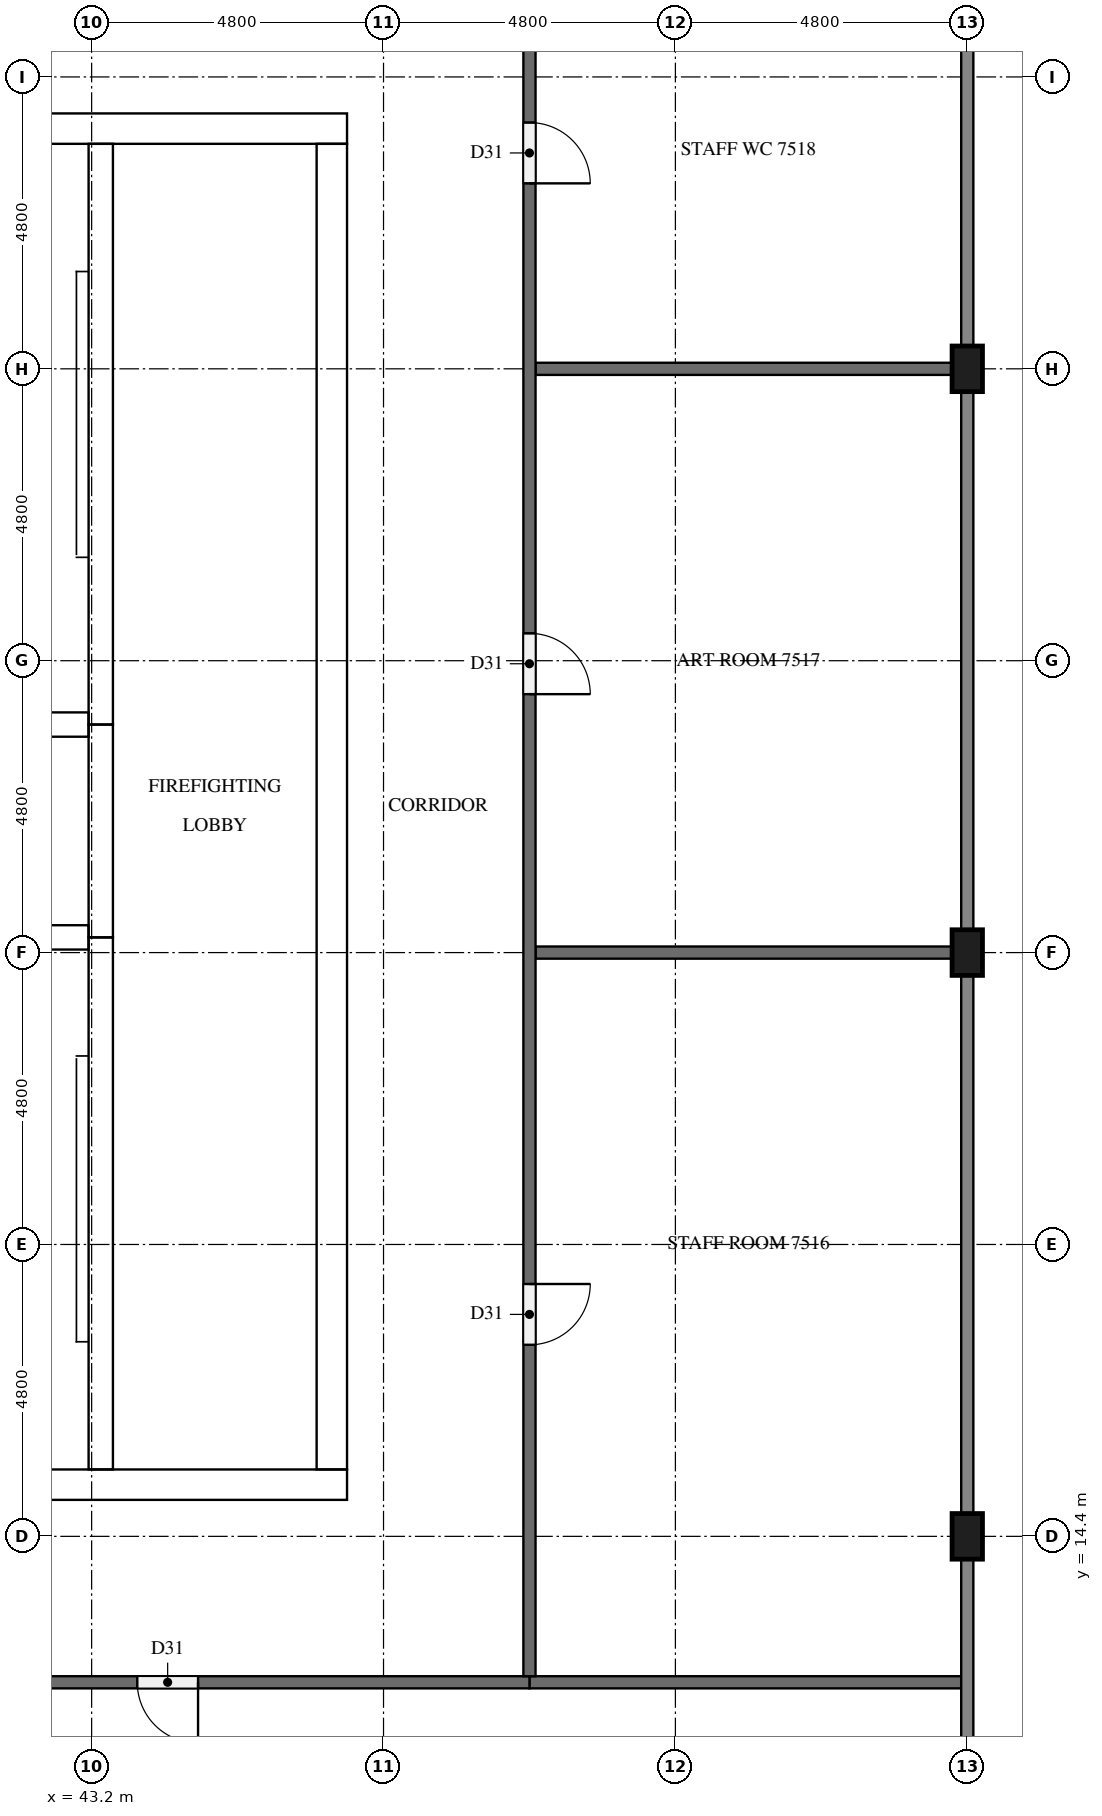
"""IFC4 building model, lengths in metres.
Left out: names, types, materials, properties, quantities, classifications, styles, units other than length and angle.
Written with IfcOpenShell. Run it as: python <this file> out.ifc"""

import sys

from ifc_helpers import new_model, si_unit, direction, frame, frame_2d, origin, origin_2d, place, context, subcontext, project, spatial, rectangle, extrude, element, fill, save


model = new_model("IFC4")
c1 = context("Model", 3, precision=1e-05, world=origin(), true_north=direction((0.0, 1.0)))
c2 = subcontext(c1, "Body", "Model", "MODEL_VIEW")
j1 = project(units=[si_unit("LENGTHUNIT", "METRE"), si_unit("PLANEANGLEUNIT", "RADIAN")], contexts=[c1])
p1 = place(None, origin())
s1 = spatial("IfcSite", under=j1, at=p1, CompositionType="ELEMENT")
p2 = place(p1, origin())
s2 = spatial("IfcBuilding", under=s1, at=p2, CompositionType="ELEMENT")
p3 = place(p2, frame((0.0, 0.0, 286.1)))
s3 = spatial("IfcBuildingStorey", under=s2, at=p3, CompositionType="ELEMENT", Elevation=286.1)
p4 = place(p3, frame((15.0, 15.25, 0.0), z_axis=(0.0, 0.0, 1.0), x_axis=(1.0, 0.0, 0.0)))
e1 = element("IfcWall", 1, at=p4, inside=s3, PredefinedType="SHEAR", context=c2, shape_type="SweptSolid", body=[
    extrude(rectangle(XDim=32.4, YDim=0.5, at=frame_2d((16.2, 0.0))), origin(), (0.0, 0.0, 1.0), 5.1),
])
p5 = place(p4, frame((15.3, 0.0, 0.0)))
e2 = element("IfcOpeningElement", 2, at=p5, cuts=e1, PredefinedType="OPENING", context=c2, shape_type="SweptSolid", body=[
    extrude(rectangle(XDim=1.8, YDim=2.1, at=frame_2d((0.9, 1.05))), frame((0.0, 0.26, 0.0), z_axis=(0.0, -1.0, 0.0), x_axis=(1.0, 0.0, 0.0)), (0.0, 0.0, 1.0), 0.52),
])
p6 = place(p3, frame((15.0, 37.55, 0.0), z_axis=(0.0, 0.0, 1.0), x_axis=(1.0, 0.0, 0.0)))
e3 = element("IfcWall", 3, at=p6, inside=s3, PredefinedType="SHEAR", context=c2, shape_type="SweptSolid", body=[
    extrude(rectangle(XDim=32.4, YDim=0.5, at=frame_2d((16.2, 0.0))), origin(), (0.0, 0.0, 1.0), 5.1),
])
p7 = place(p6, frame((15.3, 0.0, 0.0)))
e4 = element("IfcOpeningElement", 4, at=p7, cuts=e3, PredefinedType="OPENING", context=c2, shape_type="SweptSolid", body=[
    extrude(rectangle(XDim=1.8, YDim=2.1, at=frame_2d((0.9, 1.05))), frame((0.0, 0.26, 0.0), z_axis=(0.0, -1.0, 0.0), x_axis=(1.0, 0.0, 0.0)), (0.0, 0.0, 1.0), 0.52),
])
p8 = place(p6, frame((1.282, 0.0, 0.0)))
e5 = element("IfcOpeningElement", 5, at=p8, cuts=e3, PredefinedType="OPENING", context=c2, shape_type="SweptSolid", body=[
    extrude(rectangle(XDim=1.0, YDim=2.1, at=frame_2d((0.5, 1.05))), frame((0.0, 0.26, 0.0), z_axis=(0.0, -1.0, 0.0), x_axis=(1.0, 0.0, 0.0)), (0.0, 0.0, 1.0), 0.52),
])
p9 = place(p6, frame((5.082, 0.0, 0.0)))
e6 = element("IfcOpeningElement", 6, at=p9, cuts=e3, PredefinedType="OPENING", context=c2, shape_type="SweptSolid", body=[
    extrude(rectangle(XDim=1.0, YDim=2.1, at=frame_2d((0.5, 1.05))), frame((0.0, 0.26, 0.0), z_axis=(0.0, -1.0, 0.0), x_axis=(1.0, 0.0, 0.0)), (0.0, 0.0, 1.0), 0.52),
])
p10 = place(p3, frame((47.15, 15.5, 0.0), z_axis=(0.0, 0.0, 1.0), x_axis=(0.0, 1.0, 0.0)))
e7 = element("IfcWall", 7, at=p10, inside=s3, PredefinedType="SHEAR", context=c2, shape_type="SweptSolid", body=[
    extrude(rectangle(XDim=21.8, YDim=0.5, at=frame_2d((10.9, 0.0))), origin(), (0.0, 0.0, 1.0), 5.1),
])
p11 = place(p10, frame((10.6, 0.0, 0.0)))
e8 = element("IfcOpeningElement", 8, at=p11, cuts=e7, PredefinedType="OPENING", context=c2, shape_type="SweptSolid", body=[
    extrude(rectangle(XDim=1.2, YDim=2.1, at=frame_2d((0.6, 1.05))), frame((0.0, 0.26, 0.0), z_axis=(0.0, -1.0, 0.0), x_axis=(1.0, 0.0, 0.0)), (0.0, 0.0, 1.0), 0.52),
])
p12 = place(p3, frame((43.35, 15.5, 0.0), z_axis=(0.0, 0.0, 1.0), x_axis=(0.0, 1.0, 0.0)))
e9 = element("IfcWall", 9, at=p12, inside=s3, PredefinedType="SHEAR", context=c2, shape_type="SweptSolid", body=[
    extrude(rectangle(XDim=8.75, YDim=0.4, at=frame_2d((4.375, 0.0))), origin(), (0.0, 0.0, 1.0), 5.1),
])
p13 = place(p12, frame((0.7, 0.0, 0.0)))
e10 = element("IfcOpeningElement", 10, at=p13, cuts=e9, PredefinedType="OPENING", context=c2, shape_type="SweptSolid", body=[
    extrude(rectangle(XDim=1.2, YDim=2.1, at=frame_2d((0.6, 1.05))), frame((0.0, 0.21, 0.0), z_axis=(0.0, -1.0, 0.0), x_axis=(1.0, 0.0, 0.0)), (0.0, 0.0, 1.0), 0.42),
])
p14 = place(p3, frame((43.35, 24.25, 0.0), z_axis=(0.0, 0.0, 1.0), x_axis=(0.0, 1.0, 0.0)))
e11 = element("IfcWall", 11, at=p14, inside=s3, PredefinedType="SHEAR", context=c2, shape_type="SweptSolid", body=[
    extrude(rectangle(XDim=3.5, YDim=0.4, at=frame_2d((1.75, 0.0))), origin(), (0.0, 0.0, 1.0), 5.1),
])
p15 = place(p14, frame((1.2, 0.0, 0.0)))
e12 = element("IfcOpeningElement", 12, at=p15, cuts=e11, PredefinedType="OPENING", context=c2, shape_type="SweptSolid", body=[
    extrude(rectangle(XDim=1.1, YDim=2.1, at=frame_2d((0.55, 1.05))), frame((0.0, 0.21, 0.0), z_axis=(0.0, -1.0, 0.0), x_axis=(1.0, 0.0, 0.0)), (0.0, 0.0, 1.0), 0.42),
])
p16 = place(p3, frame((43.35, 27.75, 0.0), z_axis=(0.0, 0.0, 1.0), x_axis=(0.0, 1.0, 0.0)))
e13 = element("IfcWall", 13, at=p16, inside=s3, PredefinedType="SHEAR", context=c2, shape_type="SweptSolid", body=[
    extrude(rectangle(XDim=9.55, YDim=0.4, at=frame_2d((4.775, 0.0))), origin(), (0.0, 0.0, 1.0), 5.1),
])
p17 = place(p16, frame((7.65, 0.0, 0.0)))
e14 = element("IfcOpeningElement", 14, at=p17, cuts=e13, PredefinedType="OPENING", context=c2, shape_type="SweptSolid", body=[
    extrude(rectangle(XDim=1.2, YDim=2.1, at=frame_2d((0.6, 1.05))), frame((0.0, 0.21, 0.0), z_axis=(0.0, -1.0, 0.0), x_axis=(1.0, 0.0, 0.0)), (0.0, 0.0, 1.0), 0.42),
])
for number, where, z_axis, x_axis in (
    (15, (39.5, 24.25, 0.0), (0.0, 0.0, 1.0), (1.0, 0.0, 0.0)),
    (16, (39.5, 27.75, 0.0), (0.0, 0.0, 1.0), (1.0, 0.0, 0.0)),
):
    element("IfcWall", number, at=place(p3, frame(where, z_axis=z_axis, x_axis=x_axis)), inside=s3, PredefinedType="SHEAR", context=c2, shape_type="SweptSolid", body=[
        extrude(rectangle(XDim=3.65, YDim=0.4, at=frame_2d((1.825, 0.0))), origin(), (0.0, 0.0, 1.0), 5.1),
    ])
for number, where, z_axis, x_axis in (
    (17, (57.6, 14.4, 0.0), (0.0, 0.0, 1.0), (0.0, 1.0, 0.0)),
    (18, (57.6, 24.0, 0.0), (0.0, 0.0, 1.0), (0.0, 1.0, 0.0)),
    (19, (57.6, 33.6, 0.0), (0.0, 0.0, 1.0), (0.0, 1.0, 0.0)),
):
    element("IfcColumn", number, at=place(p3, frame(where, z_axis=z_axis, x_axis=x_axis)), inside=s3, PredefinedType="COLUMN", context=c2, shape_type="SweptSolid", body=[
        extrude(rectangle(XDim=0.75, YDim=0.5, at=origin_2d()), origin(), (0.0, 0.0, 1.0), 5.1),
    ])
p18 = place(p3, frame((50.4, 12.0, 0.0), z_axis=(0.0, 0.0, 1.0), x_axis=(1.0, 0.0, 0.0)))
e20 = element("IfcWall", 20, at=p18, inside=s3, PredefinedType="PARTITIONING", context=c2, shape_type="SweptSolid", body=[
    extrude(rectangle(XDim=7.1, YDim=0.2, at=frame_2d((3.55, 0.0))), origin(), (0.0, 0.0, 1.0), 5.1),
])
p19 = place(p3, frame((50.4, 12.0, 0.0), z_axis=(0.0, 0.0, 1.0), x_axis=(-1.0, 0.0, 0.0)))
e21 = element("IfcWall", 21, at=p19, inside=s3, PredefinedType="PARTITIONING", context=c2, shape_type="SweptSolid", body=[
    extrude(rectangle(XDim=21.6, YDim=0.2, at=frame_2d((10.8, 0.0))), origin(), (0.0, 0.0, 1.0), 5.1),
])
p20 = place(p19, frame((16.25, 0.0, 0.0)))
e22 = element("IfcOpeningElement", 22, at=p20, cuts=e21, PredefinedType="OPENING", context=c2, shape_type="SweptSolid", body=[
    extrude(rectangle(XDim=1.0, YDim=2.1, at=frame_2d((0.5, 1.05))), frame((0.0, 0.11, 0.0), z_axis=(0.0, -1.0, 0.0), x_axis=(1.0, 0.0, 0.0)), (0.0, 0.0, 1.0), 0.22),
])
p21 = place(p19, frame((5.45, 0.0, 0.0)))
e23 = element("IfcOpeningElement", 23, at=p21, cuts=e21, PredefinedType="OPENING", context=c2, shape_type="SweptSolid", body=[
    extrude(rectangle(XDim=1.0, YDim=2.1, at=frame_2d((0.5, 1.05))), frame((0.0, 0.11, 0.0), z_axis=(0.0, -1.0, 0.0), x_axis=(1.0, 0.0, 0.0)), (0.0, 0.0, 1.0), 0.22),
])
for number, where, z_axis, x_axis in (
    (24, (50.5, 24.0, 0.0), (0.0, 0.0, 1.0), (1.0, 0.0, 0.0)),
    (25, (50.5, 33.6, 0.0), (0.0, 0.0, 1.0), (1.0, 0.0, 0.0)),
):
    element("IfcWall", number, at=place(p3, frame(where, z_axis=z_axis, x_axis=x_axis)), inside=s3, PredefinedType="PARTITIONING", context=c2, shape_type="SweptSolid", body=[
        extrude(rectangle(XDim=7.0, YDim=0.2, at=frame_2d((3.5, 0.0))), origin(), (0.0, 0.0, 1.0), 5.1),
    ])
p22 = place(p3, frame((50.4, 40.7, 0.0), z_axis=(0.0, 0.0, 1.0), x_axis=(0.0, -1.0, 0.0)))
e26 = element("IfcWall", 26, at=p22, inside=s3, PredefinedType="PARTITIONING", context=c2, shape_type="SweptSolid", body=[
    extrude(rectangle(XDim=28.6, YDim=0.2, at=frame_2d((14.3, 0.0))), origin(), (0.0, 0.0, 1.0), 5.1),
])
p23 = place(p22, frame((22.15, 0.0, 0.0)))
e27 = element("IfcOpeningElement", 27, at=p23, cuts=e26, PredefinedType="OPENING", context=c2, shape_type="SweptSolid", body=[
    extrude(rectangle(XDim=1.0, YDim=2.1, at=frame_2d((0.5, 1.05))), frame((0.0, 0.11, 0.0), z_axis=(0.0, -1.0, 0.0), x_axis=(1.0, 0.0, 0.0)), (0.0, 0.0, 1.0), 0.22),
])
p24 = place(p22, frame((11.45, 0.0, 0.0)))
e28 = element("IfcOpeningElement", 28, at=p24, cuts=e26, PredefinedType="OPENING", context=c2, shape_type="SweptSolid", body=[
    extrude(rectangle(XDim=1.0, YDim=2.1, at=frame_2d((0.5, 1.05))), frame((0.0, 0.11, 0.0), z_axis=(0.0, -1.0, 0.0), x_axis=(1.0, 0.0, 0.0)), (0.0, 0.0, 1.0), 0.22),
])
p25 = place(p22, frame((3.05, 0.0, 0.0)))
e29 = element("IfcOpeningElement", 29, at=p25, cuts=e26, PredefinedType="OPENING", context=c2, shape_type="SweptSolid", body=[
    extrude(rectangle(XDim=1.0, YDim=2.1, at=frame_2d((0.5, 1.05))), frame((0.0, 0.11, 0.0), z_axis=(0.0, -1.0, 0.0), x_axis=(1.0, 0.0, 0.0)), (0.0, 0.0, 1.0), 0.22),
])
p26 = place(p15, origin())
e30 = element("IfcDoor", 30, at=p26, inside=s3, OperationType="DOUBLE_DOOR_SLIDING", PredefinedType="DOOR", context=c2, shape_type="SweptSolid", body=[
    extrude(rectangle(XDim=1.1, YDim=2.1, at=frame_2d((0.55, 1.05))), frame((0.0, 0.025, 0.0), z_axis=(0.0, -1.0, 0.0), x_axis=(1.0, 0.0, 0.0)), (0.0, 0.0, 1.0), 0.05),
])
fill(e12, e30)
p27 = place(p13, origin())
e31 = element("IfcDoor", 31, at=p27, inside=s3, OperationType="SINGLE_SWING_RIGHT", PredefinedType="DOOR", context=c2, shape_type="SweptSolid", body=[
    extrude(rectangle(XDim=1.2, YDim=2.1, at=frame_2d((0.6, 1.05))), frame((0.0, 0.025, 0.0), z_axis=(0.0, -1.0, 0.0), x_axis=(1.0, 0.0, 0.0)), (0.0, 0.0, 1.0), 0.05),
])
fill(e10, e31)
p28 = place(p17, origin())
e32 = element("IfcDoor", 32, at=p28, inside=s3, OperationType="SINGLE_SWING_LEFT", PredefinedType="DOOR", context=c2, shape_type="SweptSolid", body=[
    extrude(rectangle(XDim=1.2, YDim=2.1, at=frame_2d((0.6, 1.05))), frame((0.0, 0.025, 0.0), z_axis=(0.0, -1.0, 0.0), x_axis=(1.0, 0.0, 0.0)), (0.0, 0.0, 1.0), 0.05),
])
fill(e14, e32)
p29 = place(p11, origin())
e33 = element("IfcDoor", 33, at=p29, inside=s3, OperationType="SINGLE_SWING_LEFT", PredefinedType="DOOR", context=c2, shape_type="SweptSolid", body=[
    extrude(rectangle(XDim=1.2, YDim=2.1, at=frame_2d((0.6, 1.05))), frame((0.0, 0.025, 0.0), z_axis=(0.0, -1.0, 0.0), x_axis=(1.0, 0.0, 0.0)), (0.0, 0.0, 1.0), 0.05),
])
fill(e8, e33)
p30 = place(p21, origin())
e34 = element("IfcDoor", 34, at=p30, inside=s3, OperationType="SINGLE_SWING_LEFT", PredefinedType="DOOR", context=c2, shape_type="SweptSolid", body=[
    extrude(rectangle(XDim=1.0, YDim=2.1, at=frame_2d((0.5, 1.05))), frame((0.0, 0.025, 0.0), z_axis=(0.0, -1.0, 0.0), x_axis=(1.0, 0.0, 0.0)), (0.0, 0.0, 1.0), 0.05),
])
fill(e23, e34)
p31 = place(p23, origin())
e35 = element("IfcDoor", 35, at=p31, inside=s3, OperationType="SINGLE_SWING_LEFT", PredefinedType="DOOR", context=c2, shape_type="SweptSolid", body=[
    extrude(rectangle(XDim=1.0, YDim=2.1, at=frame_2d((0.5, 1.05))), frame((0.0, 0.025, 0.0), z_axis=(0.0, -1.0, 0.0), x_axis=(1.0, 0.0, 0.0)), (0.0, 0.0, 1.0), 0.05),
])
fill(e27, e35)
p32 = place(p24, origin())
e36 = element("IfcDoor", 36, at=p32, inside=s3, OperationType="SINGLE_SWING_RIGHT", PredefinedType="DOOR", context=c2, shape_type="SweptSolid", body=[
    extrude(rectangle(XDim=1.0, YDim=2.1, at=frame_2d((0.5, 1.05))), frame((0.0, 0.025, 0.0), z_axis=(0.0, -1.0, 0.0), x_axis=(1.0, 0.0, 0.0)), (0.0, 0.0, 1.0), 0.05),
])
fill(e28, e36)
p33 = place(p25, origin())
e37 = element("IfcDoor", 37, at=p33, inside=s3, OperationType="SINGLE_SWING_RIGHT", PredefinedType="DOOR", context=c2, shape_type="SweptSolid", body=[
    extrude(rectangle(XDim=1.0, YDim=2.1, at=frame_2d((0.5, 1.05))), frame((0.0, 0.025, 0.0), z_axis=(0.0, -1.0, 0.0), x_axis=(1.0, 0.0, 0.0)), (0.0, 0.0, 1.0), 0.05),
])
fill(e29, e37)
save(model, sys.argv[1])
